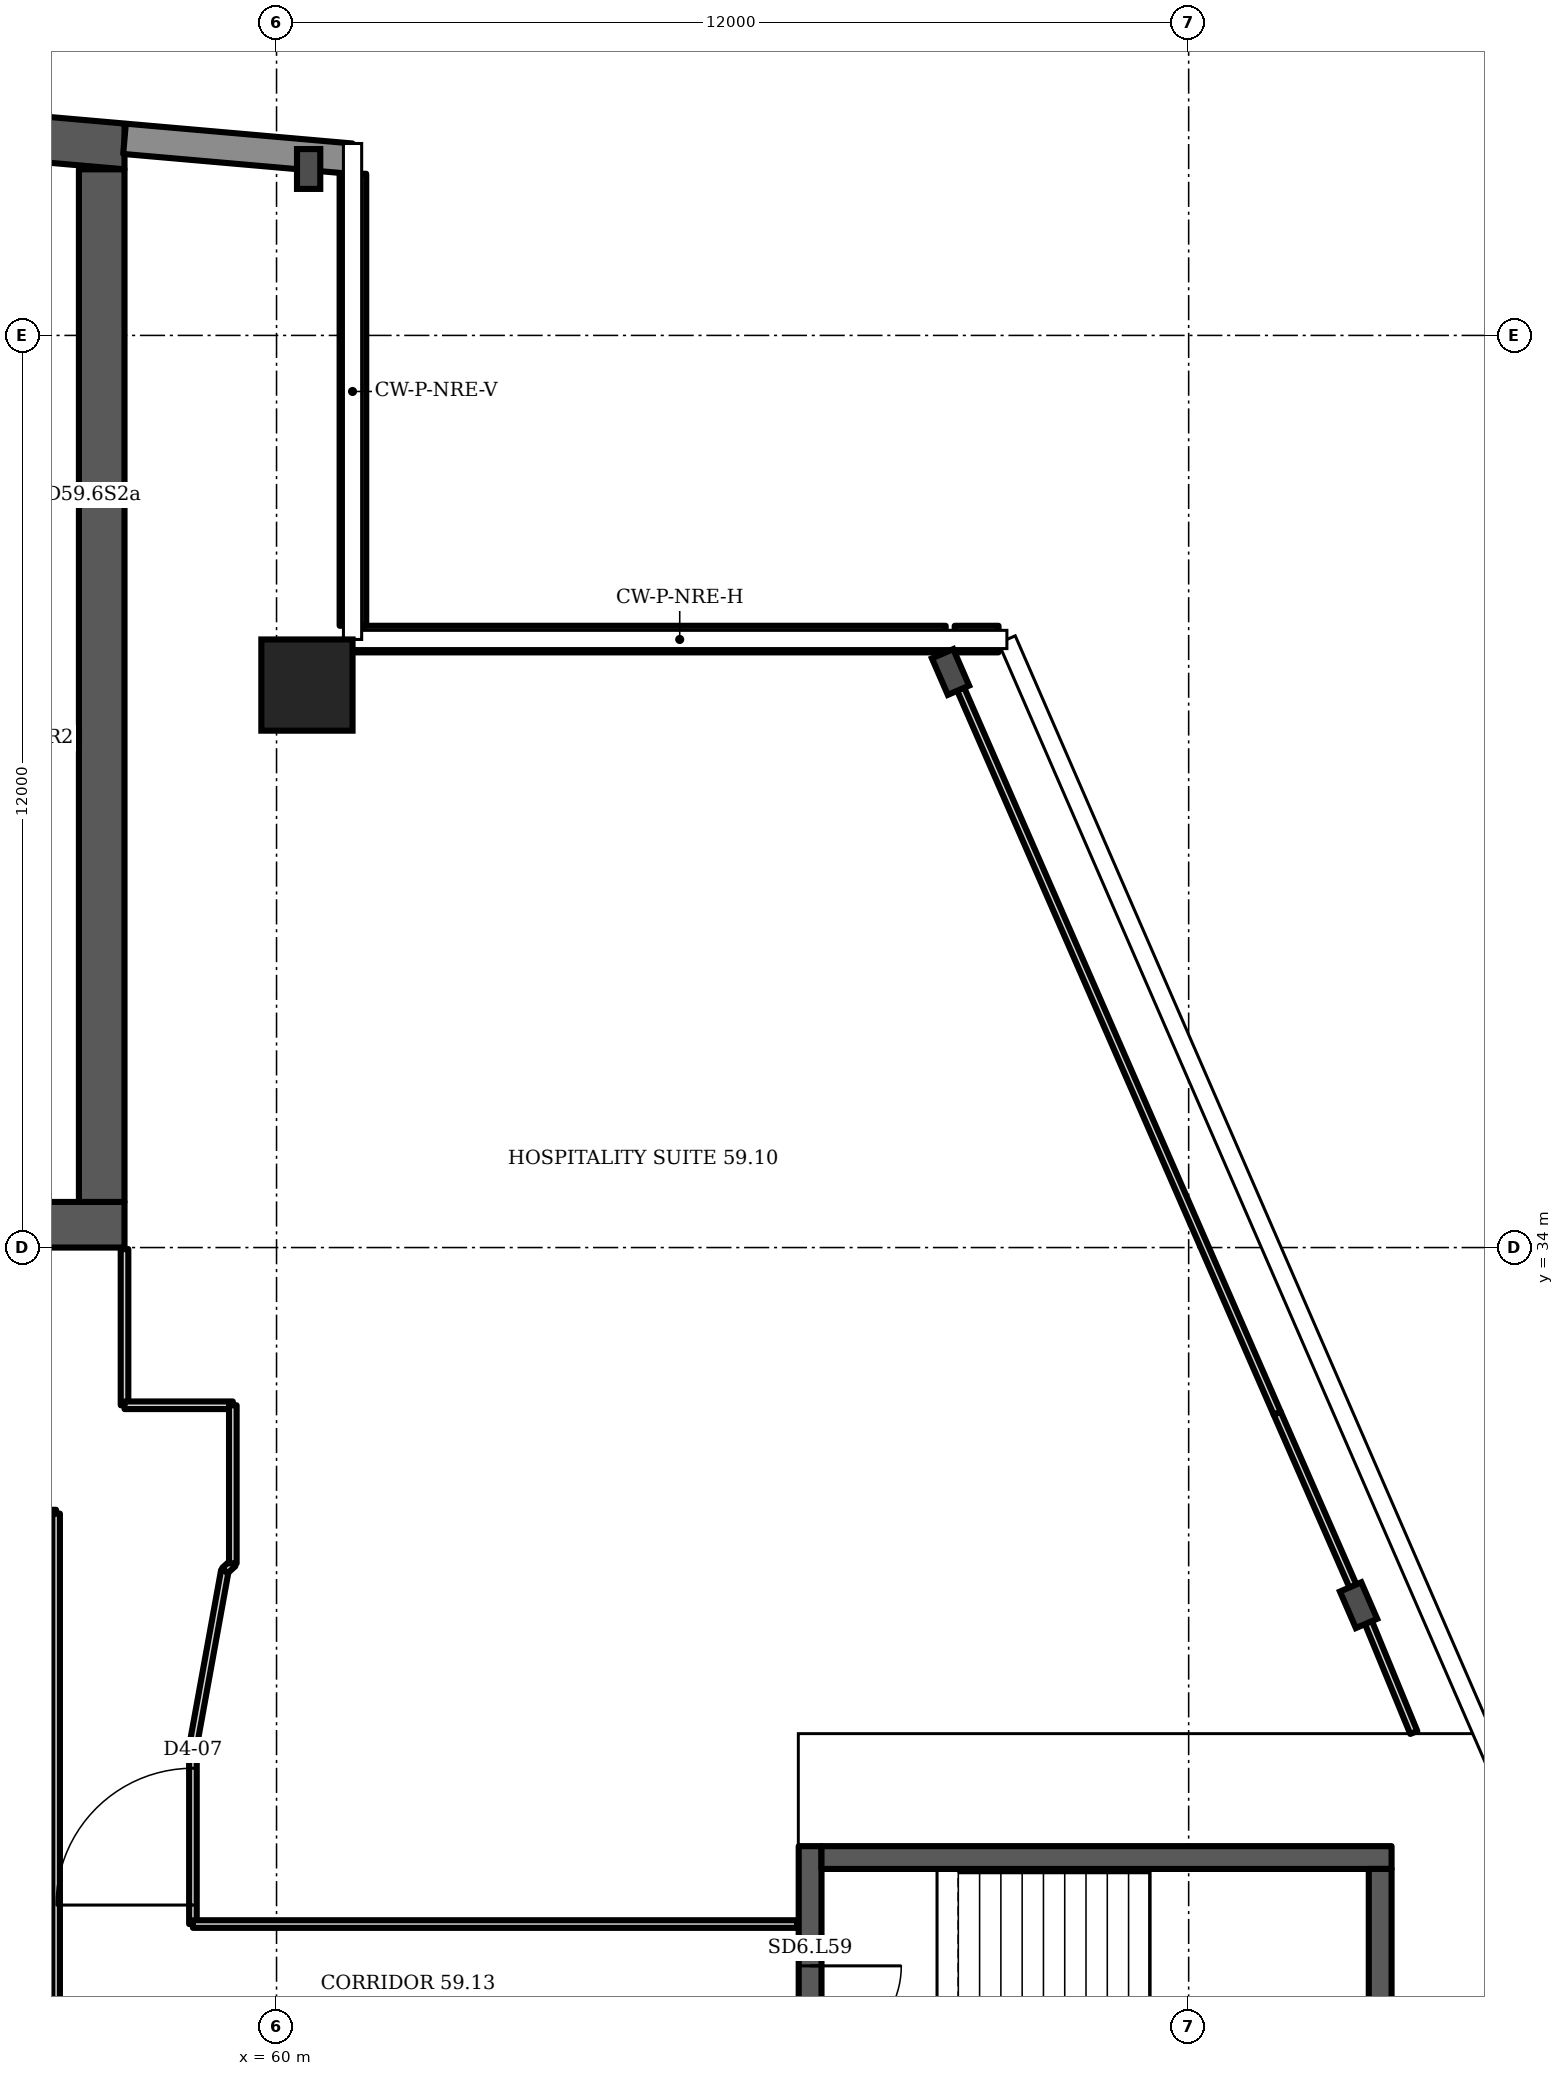
"""IFC4 building model, lengths in metres.
Left out: names, types, materials, properties, quantities, classifications, styles, units other than length and angle.
Written with IfcOpenShell. Run it as: python <this file> out.ifc"""

import sys

from ifc_helpers import new_model, si_unit, direction, frame, frame_2d, origin, origin_2d, place, context, subcontext, project, spatial, polyline, rectangle, i_section, outline, extrude, element, fill, save


model = new_model("IFC4")
c1 = context("Model", 3, precision=1e-05, world=origin(), true_north=direction((0.0, 1.0)))
c2 = subcontext(c1, "Body", "Model", "MODEL_VIEW")
j1 = project(units=[si_unit("LENGTHUNIT", "METRE"), si_unit("PLANEANGLEUNIT", "RADIAN")], contexts=[c1])
p1 = place(None, origin())
s1 = spatial("IfcSite", under=j1, at=p1, CompositionType="ELEMENT")
p2 = place(p1, origin())
s2 = spatial("IfcBuilding", under=s1, at=p2, CompositionType="ELEMENT")
p3 = place(p2, frame((0.0, 0.0, 235.9)))
s3 = spatial("IfcBuildingStorey", under=s2, at=p3, CompositionType="ELEMENT", Elevation=235.9)
p4 = place(p3, origin())
e1 = element("IfcWall", 1, at=p4, inside=s3, PredefinedType="SHEAR", context=c2, shape_type="SweptSolid", body=[
    extrude(outline(polyline([(23.0, 48.185), (40.5, 49.716), (58.0, 48.185), (58.0, 48.787), (40.5, 50.318), (23.0, 48.787), (23.0, 48.185)])), origin(), (0.0, 0.0, 1.0), 3.6),
])
p5 = place(p3, frame((23.0, 34.3, 0.0), z_axis=(0.0, 0.0, 1.0), x_axis=(1.0, 0.0, 0.0)))
e2 = element("IfcWall", 2, at=p5, inside=s3, PredefinedType="SHEAR", context=c2, shape_type="SweptSolid", body=[
    extrude(rectangle(XDim=35.0, YDim=0.6, at=frame_2d((17.5, 0.0))), origin(), (0.0, 0.0, 1.0), 3.6),
])
p6 = place(p5, frame((0.65, 0.0, 0.0)))
e3 = element("IfcOpeningElement", 3, at=p6, cuts=e2, PredefinedType="OPENING", context=c2, shape_type="SweptSolid", body=[
    extrude(rectangle(XDim=1.2, YDim=2.1, at=frame_2d((0.6, 1.05))), frame((0.0, 0.31, 0.0), z_axis=(0.0, -1.0, 0.0), x_axis=(1.0, 0.0, 0.0)), (0.0, 0.0, 1.0), 0.62),
])
p7 = place(p5, frame((7.717, 0.0, 0.0)))
e4 = element("IfcOpeningElement", 4, at=p7, cuts=e2, PredefinedType="OPENING", context=c2, shape_type="SweptSolid", body=[
    extrude(rectangle(XDim=1.1, YDim=2.1, at=frame_2d((0.55, 1.05))), frame((0.0, 0.31, 0.0), z_axis=(0.0, -1.0, 0.0), x_axis=(1.0, 0.0, 0.0)), (0.0, 0.0, 1.0), 0.62),
])
p8 = place(p5, frame((12.183, 0.0, 0.0)))
e5 = element("IfcOpeningElement", 5, at=p8, cuts=e2, PredefinedType="OPENING", context=c2, shape_type="SweptSolid", body=[
    extrude(rectangle(XDim=1.1, YDim=2.1, at=frame_2d((0.55, 1.05))), frame((0.0, 0.31, 0.0), z_axis=(0.0, -1.0, 0.0), x_axis=(1.0, 0.0, 0.0)), (0.0, 0.0, 1.0), 0.62),
])
p9 = place(p5, frame((9.8, 0.0, 0.0)))
e6 = element("IfcOpeningElement", 6, at=p9, cuts=e2, PredefinedType="OPENING", context=c2, shape_type="SweptSolid", body=[
    extrude(rectangle(XDim=1.4, YDim=2.1, at=frame_2d((0.7, 1.05))), frame((0.0, 0.31, 0.0), z_axis=(0.0, -1.0, 0.0), x_axis=(1.0, 0.0, 0.0)), (0.0, 0.0, 1.0), 0.62),
])
p10 = place(p5, frame((14.717, 0.0, 0.0)))
e7 = element("IfcOpeningElement", 7, at=p10, cuts=e2, PredefinedType="OPENING", context=c2, shape_type="SweptSolid", body=[
    extrude(rectangle(XDim=1.1, YDim=2.1, at=frame_2d((0.55, 1.05))), frame((0.0, 0.31, 0.0), z_axis=(0.0, -1.0, 0.0), x_axis=(1.0, 0.0, 0.0)), (0.0, 0.0, 1.0), 0.62),
])
p11 = place(p5, frame((16.95, 0.0, 0.0)))
e8 = element("IfcOpeningElement", 8, at=p11, cuts=e2, PredefinedType="OPENING", context=c2, shape_type="SweptSolid", body=[
    extrude(rectangle(XDim=1.1, YDim=2.1, at=frame_2d((0.55, 1.05))), frame((0.0, 0.31, 0.0), z_axis=(0.0, -1.0, 0.0), x_axis=(1.0, 0.0, 0.0)), (0.0, 0.0, 1.0), 0.62),
])
p12 = place(p5, frame((19.183, 0.0, 0.0)))
e9 = element("IfcOpeningElement", 9, at=p12, cuts=e2, PredefinedType="OPENING", context=c2, shape_type="SweptSolid", body=[
    extrude(rectangle(XDim=1.1, YDim=2.1, at=frame_2d((0.55, 1.05))), frame((0.0, 0.31, 0.0), z_axis=(0.0, -1.0, 0.0), x_axis=(1.0, 0.0, 0.0)), (0.0, 0.0, 1.0), 0.62),
])
p13 = place(p5, frame((26.15, 0.0, 0.0)))
e10 = element("IfcOpeningElement", 10, at=p13, cuts=e2, PredefinedType="OPENING", context=c2, shape_type="SweptSolid", body=[
    extrude(rectangle(XDim=1.2, YDim=2.1, at=frame_2d((0.6, 1.05))), frame((0.0, 0.31, 0.0), z_axis=(0.0, -1.0, 0.0), x_axis=(1.0, 0.0, 0.0)), (0.0, 0.0, 1.0), 0.62),
])
p14 = place(p5, frame((30.8, 0.0, 0.0)))
e11 = element("IfcOpeningElement", 11, at=p14, cuts=e2, PredefinedType="OPENING", context=c2, shape_type="SweptSolid", body=[
    extrude(rectangle(XDim=1.4, YDim=2.1, at=frame_2d((0.7, 1.05))), frame((0.0, 0.31, 0.0), z_axis=(0.0, -1.0, 0.0), x_axis=(1.0, 0.0, 0.0)), (0.0, 0.0, 1.0), 0.62),
])
p15 = place(p3, frame((57.7, 34.6, 0.0), z_axis=(0.0, 0.0, 1.0), x_axis=(0.0, 1.0, 0.0)))
e12 = element("IfcWall", 12, at=p15, inside=s3, PredefinedType="SHEAR", context=c2, shape_type="SweptSolid", body=[
    extrude(rectangle(XDim=13.585, YDim=0.6, at=frame_2d((6.792, 0.0))), origin(), (0.0, 0.0, 1.0), 3.6),
])
p16 = place(p3, frame((60.4, 41.4, 0.0), z_axis=(0.0, 0.0, 1.0), x_axis=(1.0, 0.0, 0.0)))
e13 = element("IfcColumn", 13, at=p16, inside=s3, PredefinedType="COLUMN", context=c2, shape_type="SweptSolid", body=[
    extrude(rectangle(XDim=1.2, YDim=1.2, at=origin_2d()), origin(), (0.0, 0.0, 1.0), 3.6),
])
for number, where, z_axis, x_axis in (
    (14, (74.235, 29.295, 0.0), (0.0, 0.0, 1.0), (0.917, 0.399, 0.0)),
    (15, (68.867, 41.572, 0.0), (0.0, 0.0, 1.0), (0.917, 0.399, 0.0)),
    (16, (60.422, 48.189, 0.0), (0.0, 0.0, 1.0), (1.0, 0.0, 0.0)),
):
    element("IfcColumn", number, at=place(p3, frame(where, z_axis=z_axis, x_axis=x_axis)), inside=s3, PredefinedType="COLUMN", context=c2, shape_type="SweptSolid", body=[
        extrude(i_section(OverallWidth=0.306, OverallDepth=0.524, WebThickness=0.021, FlangeThickness=0.04, FilletRadius=0.027, at=origin_2d()), origin(), (0.0, 0.0, 1.0), 3.6),
    ])
p17 = place(p3, frame((60.983, 48.326, 0.0), z_axis=(0.0, 0.0, 1.0), x_axis=(-0.996194, 0.087168, 0.0)))
e17 = element("IfcWall", 17, at=p17, inside=s3, PredefinedType="SOLIDWALL", context=c2, shape_type="SweptSolid", body=[
    extrude(rectangle(XDim=2.994, YDim=0.4, at=frame_2d((1.497, 0.0))), origin(), (0.0, 0.0, 1.0), 3.2),
])
p18 = place(p3, frame((69.499, 42.005, 0.0), z_axis=(0.0, 0.0, 1.0), x_axis=(-1.0, 0.0, 0.0)))
e18 = element("IfcWall", 18, at=p18, inside=s3, PredefinedType="SOLIDWALL", context=c2, shape_type="SweptSolid", body=[
    extrude(rectangle(XDim=0.577, YDim=0.35, at=frame_2d((0.288, 0.0))), origin(), (0.0, 0.0, 1.0), 1.0),
])
p19 = place(p3, frame((68.803, 42.005, 0.0), z_axis=(0.0, 0.0, 1.0), x_axis=(-1.0, 0.0, 0.0)))
e19 = element("IfcWall", 19, at=p19, inside=s3, PredefinedType="SOLIDWALL", context=c2, shape_type="SweptSolid", body=[
    extrude(rectangle(XDim=7.803, YDim=0.35, at=frame_2d((3.902, 0.0))), origin(), (0.0, 0.0, 1.0), 1.0),
])
p20 = place(p3, frame((61.005, 42.18, 0.0), z_axis=(0.0, 0.0, 1.0), x_axis=(0.0, 1.0, 0.0)))
e20 = element("IfcWall", 20, at=p20, inside=s3, PredefinedType="SOLIDWALL", context=c2, shape_type="SweptSolid", body=[
    extrude(rectangle(XDim=5.947, YDim=0.35, at=frame_2d((2.973, 0.0))), origin(), (0.0, 0.0, 1.0), 1.0),
])
p21 = place(p3, frame((51.3, 40.7, 0.0), z_axis=(0.0, 0.0, 1.0), x_axis=(1.0, 0.0, 0.0)))
e21 = element("IfcWall", 21, at=p21, inside=s3, PredefinedType="PARTITIONING", context=c2, shape_type="SweptSolid", body=[
    extrude(rectangle(XDim=6.1, YDim=0.2, at=frame_2d((3.05, 0.0))), origin(), (0.0, 0.0, 1.0), 3.2),
])
p22 = place(p21, frame((0.417, 0.0, 0.0)))
e22 = element("IfcOpeningElement", 22, at=p22, cuts=e21, PredefinedType="OPENING", context=c2, shape_type="SweptSolid", body=[
    extrude(rectangle(XDim=1.1, YDim=2.1, at=frame_2d((0.55, 1.05))), frame((0.0, 0.11, 0.0), z_axis=(0.0, -1.0, 0.0), x_axis=(1.0, 0.0, 0.0)), (0.0, 0.0, 1.0), 0.22),
])
p23 = place(p21, frame((3.617, 0.0, 0.0)))
e23 = element("IfcOpeningElement", 23, at=p23, cuts=e21, PredefinedType="OPENING", context=c2, shape_type="SweptSolid", body=[
    extrude(rectangle(XDim=1.0, YDim=2.1, at=frame_2d((0.5, 1.05))), frame((0.0, 0.11, 0.0), z_axis=(0.0, -1.0, 0.0), x_axis=(1.0, 0.0, 0.0)), (0.0, 0.0, 1.0), 0.22),
])
p24 = place(p3, frame((51.3, 43.9, 0.0), z_axis=(0.0, 0.0, 1.0), x_axis=(1.0, 0.0, 0.0)))
e24 = element("IfcWall", 24, at=p24, inside=s3, PredefinedType="PARTITIONING", context=c2, shape_type="SweptSolid", body=[
    extrude(rectangle(XDim=6.1, YDim=0.2, at=frame_2d((3.05, 0.0))), origin(), (0.0, 0.0, 1.0), 3.2),
])
p25 = place(p24, frame((2.383, 0.0, 0.0)))
e25 = element("IfcOpeningElement", 25, at=p25, cuts=e24, PredefinedType="OPENING", context=c2, shape_type="SweptSolid", body=[
    extrude(rectangle(XDim=1.0, YDim=2.1, at=frame_2d((0.5, 1.05))), frame((0.0, 0.11, 0.0), z_axis=(0.0, -1.0, 0.0), x_axis=(1.0, 0.0, 0.0)), (0.0, 0.0, 1.0), 0.22),
])
p26 = place(p24, frame((4.367, 0.0, 0.0)))
e26 = element("IfcOpeningElement", 26, at=p26, cuts=e24, PredefinedType="OPENING", context=c2, shape_type="SweptSolid", body=[
    extrude(rectangle(XDim=1.0, YDim=2.1, at=frame_2d((0.5, 1.05))), frame((0.0, 0.11, 0.0), z_axis=(0.0, -1.0, 0.0), x_axis=(1.0, 0.0, 0.0)), (0.0, 0.0, 1.0), 0.22),
])
p27 = place(p3, frame((67.02, 21.775, 0.0), z_axis=(0.0, 0.0, 1.0), x_axis=(0.0, 1.0, 0.0)))
e27 = element("IfcWall", 27, at=p27, inside=s3, PredefinedType="SHEAR", context=c2, shape_type="SweptSolid", body=[
    extrude(rectangle(XDim=4.35, YDim=0.3, at=frame_2d((2.175, 0.0))), origin(), (0.0, 0.0, 1.0), 3.2),
])
p28 = place(p27, frame((1.575, 0.0, 0.0)))
e28 = element("IfcOpeningElement", 28, at=p28, cuts=e27, PredefinedType="OPENING", context=c2, shape_type="SweptSolid", body=[
    extrude(rectangle(XDim=1.2, YDim=2.1, at=frame_2d((0.6, 1.05))), frame((0.0, 0.16, 0.0), z_axis=(0.0, -1.0, 0.0), x_axis=(1.0, 0.0, 0.0)), (0.0, 0.0, 1.0), 0.32),
])
p29 = place(p3, frame((44.15, 30.5, 0.0), z_axis=(0.0, 0.0, 1.0), x_axis=(1.0, 0.0, 0.0)))
e29 = element("IfcWall", 29, at=p29, inside=s3, PredefinedType="PARTITIONING", context=c2, shape_type="SweptSolid", body=[
    extrude(rectangle(XDim=12.95, YDim=0.1, at=frame_2d((6.475, 0.0))), origin(), (0.0, 0.0, 1.0), 3.2),
])
p30 = place(p29, frame((5.17, 0.0, 0.0)))
e30 = element("IfcOpeningElement", 30, at=p30, cuts=e29, PredefinedType="OPENING", context=c2, shape_type="SweptSolid", body=[
    extrude(rectangle(XDim=1.0, YDim=2.1, at=frame_2d((0.5, 1.05))), frame((0.0, 0.06, 0.0), z_axis=(0.0, -1.0, 0.0), x_axis=(1.0, 0.0, 0.0)), (0.0, 0.0, 1.0), 0.12),
])
p31 = place(p3, frame((57.1, 14.345, 0.0), z_axis=(0.0, 0.0, 1.0), x_axis=(0.0, 1.0, 0.0)))
e31 = element("IfcWall", 31, at=p31, inside=s3, PredefinedType="PARTITIONING", context=c2, shape_type="SweptSolid", body=[
    extrude(rectangle(XDim=16.155, YDim=0.1, at=frame_2d((8.078, 0.0))), origin(), (0.0, 0.0, 1.0), 3.2),
])
p32 = place(p31, frame((5.215, 0.0, 0.0)))
e32 = element("IfcOpeningElement", 32, at=p32, cuts=e31, PredefinedType="OPENING", context=c2, shape_type="SweptSolid", body=[
    extrude(rectangle(XDim=1.0, YDim=2.1, at=frame_2d((0.5, 1.05))), frame((0.0, 0.06, 0.0), z_axis=(0.0, -1.0, 0.0), x_axis=(1.0, 0.0, 0.0)), (0.0, 0.0, 1.0), 0.12),
])
p33 = place(p3, frame((58.0, 31.925, 0.0), z_axis=(0.0, 0.0, 1.0), x_axis=(0.0, 1.0, 0.0)))
e33 = element("IfcWall", 33, at=p33, inside=s3, PredefinedType="PARTITIONING", context=c2, shape_type="SweptSolid", body=[
    extrude(rectangle(XDim=2.055, YDim=0.1, at=frame_2d((1.027, 0.0))), origin(), (0.0, 0.0, 1.0), 3.2),
])
p34 = place(p3, frame((58.0, 31.925, 0.0), z_axis=(0.0, 0.0, 1.0), x_axis=(1.0, 0.0, 0.0)))
e34 = element("IfcWall", 34, at=p34, inside=s3, PredefinedType="PARTITIONING", context=c2, shape_type="SweptSolid", body=[
    extrude(rectangle(XDim=1.425, YDim=0.1, at=frame_2d((0.712, 0.0))), origin(), (0.0, 0.0, 1.0), 3.2),
])
p35 = place(p3, frame((58.9, 25.1, 0.0), z_axis=(0.0, 0.0, 1.0), x_axis=(0.0, 1.0, 0.0)))
e35 = element("IfcWall", 35, at=p35, inside=s3, PredefinedType="PARTITIONING", context=c2, shape_type="SweptSolid", body=[
    extrude(rectangle(XDim=2.335, YDim=0.1, at=frame_2d((1.167, 0.0))), origin(), (0.0, 0.0, 1.0), 3.2),
])
p36 = place(p35, frame((0.25, 0.0, 0.0)))
e36 = element("IfcOpeningElement", 36, at=p36, cuts=e35, PredefinedType="OPENING", context=c2, shape_type="SweptSolid", body=[
    extrude(rectangle(XDim=1.8, YDim=2.1, at=frame_2d((0.9, 1.05))), frame((0.0, 0.06, 0.0), z_axis=(0.0, -1.0, 0.0), x_axis=(1.0, 0.0, 0.0)), (0.0, 0.0, 1.0), 0.12),
])
p37 = place(p3, frame((58.9, 25.1, 0.0), z_axis=(0.0, 0.0, 1.0), x_axis=(1.0, 0.0, 0.0)))
e37 = element("IfcWall", 37, at=p37, inside=s3, PredefinedType="PARTITIONING", context=c2, shape_type="SweptSolid", body=[
    extrude(rectangle(XDim=7.95, YDim=0.1, at=frame_2d((3.975, 0.0))), origin(), (0.0, 0.0, 1.0), 3.2),
])
p38 = place(p3, frame((58.9, 27.435, 0.0), z_axis=(0.0, 0.0, 1.0), x_axis=(0.178584, 0.983924, 0.0)))
e38 = element("IfcWall", 38, at=p38, inside=s3, PredefinedType="PARTITIONING", context=c2, shape_type="SweptSolid", body=[
    extrude(rectangle(XDim=2.353, YDim=0.1, at=frame_2d((1.176, 0.0))), origin(), (0.0, 0.0, 1.0), 3.2),
])
p39 = place(p3, frame((59.32, 29.75, 0.0), z_axis=(0.0, 0.0, 1.0), x_axis=(0.741581, 0.670872, 0.0)))
e39 = element("IfcWall", 39, at=p39, inside=s3, PredefinedType="PARTITIONING", context=c2, shape_type="SweptSolid", body=[
    extrude(rectangle(XDim=0.142, YDim=0.1, at=frame_2d((0.071, 0.0))), origin(), (0.0, 0.0, 1.0), 3.2),
])
p40 = place(p3, frame((59.425, 29.845, 0.0), z_axis=(0.0, 0.0, 1.0), x_axis=(0.0, 1.0, 0.0)))
e40 = element("IfcWall", 40, at=p40, inside=s3, PredefinedType="PARTITIONING", context=c2, shape_type="SweptSolid", body=[
    extrude(rectangle(XDim=2.08, YDim=0.1, at=frame_2d((1.04, 0.0))), origin(), (0.0, 0.0, 1.0), 3.2),
])
p41 = place(p3, frame((73.165, 31.82, 0.0), z_axis=(0.0, 0.0, 1.0), x_axis=(-0.400551, 0.916278, 0.0)))
e41 = element("IfcWall", 41, at=p41, inside=s3, PredefinedType="PARTITIONING", context=c2, shape_type="SweptSolid", body=[
    extrude(rectangle(XDim=11.088, YDim=0.1, at=frame_2d((5.544, 0.0))), origin(), (0.0, 0.0, 1.0), 2.58),
])
p42 = place(p3, frame((74.265, 29.31, 0.0), z_axis=(0.0, 0.0, 1.0), x_axis=(-0.401346, 0.915924, 0.0)))
e42 = element("IfcWall", 42, at=p42, inside=s3, PredefinedType="PARTITIONING", context=c2, shape_type="SweptSolid", body=[
    extrude(rectangle(XDim=2.74, YDim=0.1, at=frame_2d((1.37, 0.0))), origin(), (0.0, 0.0, 1.0), 2.58),
])
p43 = place(p3, frame((74.962, 27.62, 0.0), z_axis=(0.0, 0.0, 1.0), x_axis=(-0.381293, 0.924452, 0.0)))
e43 = element("IfcWall", 43, at=p43, inside=s3, PredefinedType="PARTITIONING", context=c2, shape_type="SweptSolid", body=[
    extrude(rectangle(XDim=1.828, YDim=0.1, at=frame_2d((0.914, 0.0))), origin(), (0.0, 0.0, 1.0), 2.58),
])
p44 = place(p3, frame((67.17, 25.975, 0.0), z_axis=(0.0, 0.0, 1.0), x_axis=(1.0, 0.0, 0.0)))
e44 = element("IfcWall", 44, at=p44, inside=s3, PredefinedType="SHEAR", context=c2, shape_type="SweptSolid", body=[
    extrude(rectangle(XDim=7.5, YDim=0.3, at=frame_2d((3.75, 0.0))), origin(), (0.0, 0.0, 1.0), 3.2),
])
p45 = place(p3, frame((74.52, 22.075, 0.0), z_axis=(0.0, 0.0, 1.0), x_axis=(0.0, 1.0, 0.0)))
e45 = element("IfcWall", 45, at=p45, inside=s3, PredefinedType="SHEAR", context=c2, shape_type="SweptSolid", body=[
    extrude(rectangle(XDim=3.75, YDim=0.3, at=frame_2d((1.875, 0.0))), origin(), (0.0, 0.0, 1.0), 3.2),
])
p46 = place(p28, origin())
e46 = element("IfcDoor", 46, at=p46, inside=s3, OperationType="SINGLE_SWING_RIGHT", PredefinedType="DOOR", context=c2, shape_type="SweptSolid", body=[
    extrude(rectangle(XDim=1.2, YDim=2.1, at=frame_2d((0.6, 1.05))), frame((0.0, 0.025, 0.0), z_axis=(0.0, -1.0, 0.0), x_axis=(1.0, 0.0, 0.0)), (0.0, 0.0, 1.0), 0.05),
])
fill(e28, e46)
p47 = place(p36, origin())
e47 = element("IfcDoor", 47, at=p47, inside=s3, OperationType="DOUBLE_DOOR_SINGLE_SWING", PredefinedType="DOOR", context=c2, shape_type="SweptSolid", body=[
    extrude(rectangle(XDim=1.8, YDim=2.1, at=frame_2d((0.9, 1.05))), frame((0.0, 0.025, 0.0), z_axis=(0.0, -1.0, 0.0), x_axis=(1.0, 0.0, 0.0)), (0.0, 0.0, 1.0), 0.05),
])
fill(e36, e47)
save(model, sys.argv[1])
